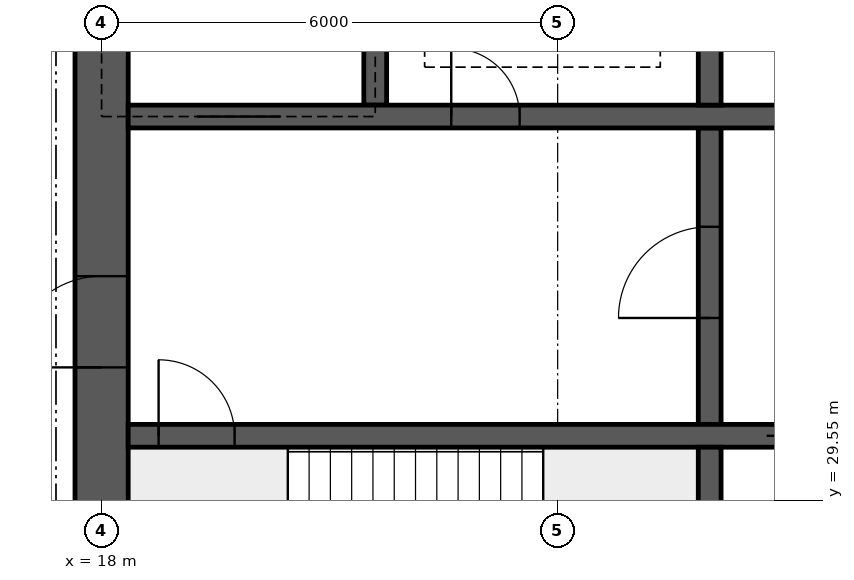
"""IFC4 building model, lengths in metres.
Left out: names, types, materials, properties, quantities, classifications, styles, units other than length and angle.
Written with IfcOpenShell. Run it as: python <this file> out.ifc"""

import sys

from ifc_helpers import new_model, si_unit, direction, frame, frame_2d, origin, place, context, subcontext, project, spatial, rectangle, extrude, element, fill, save


model = new_model("IFC4")
c1 = context("Model", 3, precision=1e-05, world=origin(), true_north=direction((0.0, 1.0)))
c2 = subcontext(c1, "Body", "Model", "MODEL_VIEW")
j1 = project(units=[si_unit("LENGTHUNIT", "METRE"), si_unit("PLANEANGLEUNIT", "RADIAN")], contexts=[c1])
p1 = place(None, origin())
s1 = spatial("IfcSite", under=j1, at=p1, CompositionType="ELEMENT")
p2 = place(p1, origin())
s2 = spatial("IfcBuilding", under=s1, at=p2, CompositionType="ELEMENT")
p3 = place(p2, frame((0.0, 0.0, 257.8)))
s3 = spatial("IfcBuildingStorey", under=s2, at=p3, CompositionType="ELEMENT", Elevation=257.8)
p4 = place(p3, frame((18.0, 26.15, 0.0), z_axis=(0.0, 0.0, 1.0), x_axis=(0.0, 1.0, 0.0)))
e1 = element("IfcWall", 1, at=p4, inside=s3, PredefinedType="SHEAR", context=c2, shape_type="SweptSolid", body=[
    extrude(rectangle(XDim=11.7, YDim=0.7, at=frame_2d((5.85, 0.0))), origin(), (0.0, 0.0, 1.0), 4.5),
])
p5 = place(p4, frame((5.15, 0.0, 0.0)))
e2 = element("IfcOpeningElement", 2, at=p5, cuts=e1, PredefinedType="OPENING", context=c2, shape_type="SweptSolid", body=[
    extrude(rectangle(XDim=1.2, YDim=2.1, at=frame_2d((0.6, 1.05))), frame((0.0, 0.36, 0.0), z_axis=(0.0, -1.0, 0.0), x_axis=(1.0, 0.0, 0.0)), (0.0, 0.0, 1.0), 0.72),
])
p6 = place(p3, frame((18.35, 30.4, 0.0), z_axis=(0.0, 0.0, 1.0), x_axis=(1.0, 0.0, 0.0)))
e3 = element("IfcWall", 3, at=p6, inside=s3, PredefinedType="SHEAR", context=c2, shape_type="SweptSolid", body=[
    extrude(rectangle(XDim=47.3, YDim=0.3, at=frame_2d((23.65, 0.0))), origin(), (0.0, 0.0, 1.0), 4.5),
])
p7 = place(p6, frame((0.4, 0.0, 0.0)))
e4 = element("IfcOpeningElement", 4, at=p7, cuts=e3, PredefinedType="OPENING", context=c2, shape_type="SweptSolid", body=[
    extrude(rectangle(XDim=1.0, YDim=2.1, at=frame_2d((0.5, 1.05))), frame((0.0, 0.16, 0.0), z_axis=(0.0, -1.0, 0.0), x_axis=(1.0, 0.0, 0.0)), (0.0, 0.0, 1.0), 0.32),
])
p8 = place(p6, frame((45.9, 0.0, 0.0)))
e5 = element("IfcOpeningElement", 5, at=p8, cuts=e3, PredefinedType="OPENING", context=c2, shape_type="SweptSolid", body=[
    extrude(rectangle(XDim=1.0, YDim=2.1, at=frame_2d((0.5, 1.05))), frame((0.0, 0.16, 0.0), z_axis=(0.0, -1.0, 0.0), x_axis=(1.0, 0.0, 0.0)), (0.0, 0.0, 1.0), 0.32),
])
p9 = place(p6, frame((8.4, 0.0, 0.0)))
e6 = element("IfcOpeningElement", 6, at=p9, cuts=e3, PredefinedType="OPENING", context=c2, shape_type="SweptSolid", body=[
    extrude(rectangle(XDim=1.1, YDim=2.1, at=frame_2d((0.55, 1.05))), frame((0.0, 0.16, 0.0), z_axis=(0.0, -1.0, 0.0), x_axis=(1.0, 0.0, 0.0)), (0.0, 0.0, 1.0), 0.32),
])
p10 = place(p6, frame((11.0, 0.0, 0.0)))
e7 = element("IfcOpeningElement", 7, at=p10, cuts=e3, PredefinedType="OPENING", context=c2, shape_type="SweptSolid", body=[
    extrude(rectangle(XDim=1.1, YDim=2.1, at=frame_2d((0.55, 1.05))), frame((0.0, 0.16, 0.0), z_axis=(0.0, -1.0, 0.0), x_axis=(1.0, 0.0, 0.0)), (0.0, 0.0, 1.0), 0.32),
])
p11 = place(p6, frame((13.6, 0.0, 0.0)))
e8 = element("IfcOpeningElement", 8, at=p11, cuts=e3, PredefinedType="OPENING", context=c2, shape_type="SweptSolid", body=[
    extrude(rectangle(XDim=1.1, YDim=2.1, at=frame_2d((0.55, 1.05))), frame((0.0, 0.16, 0.0), z_axis=(0.0, -1.0, 0.0), x_axis=(1.0, 0.0, 0.0)), (0.0, 0.0, 1.0), 0.32),
])
p12 = place(p6, frame((16.2, 0.0, 0.0)))
e9 = element("IfcOpeningElement", 9, at=p12, cuts=e3, PredefinedType="OPENING", context=c2, shape_type="SweptSolid", body=[
    extrude(rectangle(XDim=1.1, YDim=2.1, at=frame_2d((0.55, 1.05))), frame((0.0, 0.16, 0.0), z_axis=(0.0, -1.0, 0.0), x_axis=(1.0, 0.0, 0.0)), (0.0, 0.0, 1.0), 0.32),
])
p13 = place(p6, frame((18.975, 0.0, 0.0)))
e10 = element("IfcOpeningElement", 10, at=p13, cuts=e3, PredefinedType="OPENING", context=c2, shape_type="SweptSolid", body=[
    extrude(rectangle(XDim=0.9, YDim=2.1, at=frame_2d((0.45, 1.05))), frame((0.0, 0.16, 0.0), z_axis=(0.0, -1.0, 0.0), x_axis=(1.0, 0.0, 0.0)), (0.0, 0.0, 1.0), 0.32),
])
p14 = place(p6, frame((24.475, 0.0, 0.0)))
e11 = element("IfcOpeningElement", 11, at=p14, cuts=e3, PredefinedType="OPENING", context=c2, shape_type="SweptSolid", body=[
    extrude(rectangle(XDim=0.9, YDim=2.1, at=frame_2d((0.45, 1.05))), frame((0.0, 0.16, 0.0), z_axis=(0.0, -1.0, 0.0), x_axis=(1.0, 0.0, 0.0)), (0.0, 0.0, 1.0), 0.32),
])
p15 = place(p6, frame((30.267, 0.0, 0.0)))
e12 = element("IfcOpeningElement", 12, at=p15, cuts=e3, PredefinedType="OPENING", context=c2, shape_type="SweptSolid", body=[
    extrude(rectangle(XDim=1.1, YDim=2.1, at=frame_2d((0.55, 1.05))), frame((0.0, 0.16, 0.0), z_axis=(0.0, -1.0, 0.0), x_axis=(1.0, 0.0, 0.0)), (0.0, 0.0, 1.0), 0.32),
])
p16 = place(p6, frame((33.8, 0.0, 0.0)))
e13 = element("IfcOpeningElement", 13, at=p16, cuts=e3, PredefinedType="OPENING", context=c2, shape_type="SweptSolid", body=[
    extrude(rectangle(XDim=1.1, YDim=2.1, at=frame_2d((0.55, 1.05))), frame((0.0, 0.16, 0.0), z_axis=(0.0, -1.0, 0.0), x_axis=(1.0, 0.0, 0.0)), (0.0, 0.0, 1.0), 0.32),
])
p17 = place(p6, frame((37.333, 0.0, 0.0)))
e14 = element("IfcOpeningElement", 14, at=p17, cuts=e3, PredefinedType="OPENING", context=c2, shape_type="SweptSolid", body=[
    extrude(rectangle(XDim=1.1, YDim=2.1, at=frame_2d((0.55, 1.05))), frame((0.0, 0.16, 0.0), z_axis=(0.0, -1.0, 0.0), x_axis=(1.0, 0.0, 0.0)), (0.0, 0.0, 1.0), 0.32),
])
p18 = place(p3, frame((18.35, 34.6, 0.0), z_axis=(0.0, 0.0, 1.0), x_axis=(1.0, 0.0, 0.0)))
e15 = element("IfcWall", 15, at=p18, inside=s3, PredefinedType="SHEAR", context=c2, shape_type="SweptSolid", body=[
    extrude(rectangle(XDim=47.3, YDim=0.3, at=frame_2d((23.65, 0.0))), origin(), (0.0, 0.0, 1.0), 4.5),
])
p19 = place(p18, frame((0.9, 0.0, 0.0)))
e16 = element("IfcOpeningElement", 16, at=p19, cuts=e15, PredefinedType="OPENING", context=c2, shape_type="SweptSolid", body=[
    extrude(rectangle(XDim=1.1, YDim=2.1, at=frame_2d((0.55, 1.05))), frame((0.0, 0.16, 0.0), z_axis=(0.0, -1.0, 0.0), x_axis=(1.0, 0.0, 0.0)), (0.0, 0.0, 1.0), 0.32),
])
p20 = place(p18, frame((45.3, 0.0, 0.0)))
e17 = element("IfcOpeningElement", 17, at=p20, cuts=e15, PredefinedType="OPENING", context=c2, shape_type="SweptSolid", body=[
    extrude(rectangle(XDim=1.1, YDim=2.1, at=frame_2d((0.55, 1.05))), frame((0.0, 0.16, 0.0), z_axis=(0.0, -1.0, 0.0), x_axis=(1.0, 0.0, 0.0)), (0.0, 0.0, 1.0), 0.32),
])
p21 = place(p18, frame((4.25, 0.0, 0.0)))
e18 = element("IfcOpeningElement", 18, at=p21, cuts=e15, PredefinedType="OPENING", context=c2, shape_type="SweptSolid", body=[
    extrude(rectangle(XDim=0.9, YDim=2.1, at=frame_2d((0.45, 1.05))), frame((0.0, 0.16, 0.0), z_axis=(0.0, -1.0, 0.0), x_axis=(1.0, 0.0, 0.0)), (0.0, 0.0, 1.0), 0.32),
])
p22 = place(p18, frame((42.15, 0.0, 0.0)))
e19 = element("IfcOpeningElement", 19, at=p22, cuts=e15, PredefinedType="OPENING", context=c2, shape_type="SweptSolid", body=[
    extrude(rectangle(XDim=0.9, YDim=2.1, at=frame_2d((0.45, 1.05))), frame((0.0, 0.16, 0.0), z_axis=(0.0, -1.0, 0.0), x_axis=(1.0, 0.0, 0.0)), (0.0, 0.0, 1.0), 0.32),
])
p23 = place(p18, frame((9.025, 0.0, 0.0)))
e20 = element("IfcOpeningElement", 20, at=p23, cuts=e15, PredefinedType="OPENING", context=c2, shape_type="SweptSolid", body=[
    extrude(rectangle(XDim=0.9, YDim=2.1, at=frame_2d((0.45, 1.05))), frame((0.0, 0.16, 0.0), z_axis=(0.0, -1.0, 0.0), x_axis=(1.0, 0.0, 0.0)), (0.0, 0.0, 1.0), 0.32),
])
p24 = place(p18, frame((12.999, 0.0, 0.0)))
e21 = element("IfcOpeningElement", 21, at=p24, cuts=e15, PredefinedType="OPENING", context=c2, shape_type="SweptSolid", body=[
    extrude(rectangle(XDim=0.9, YDim=2.1, at=frame_2d((0.45, 1.05))), frame((0.0, 0.16, 0.0), z_axis=(0.0, -1.0, 0.0), x_axis=(1.0, 0.0, 0.0)), (0.0, 0.0, 1.0), 0.32),
])
p25 = place(p18, frame((16.646, 0.0, 0.0)))
e22 = element("IfcOpeningElement", 22, at=p25, cuts=e15, PredefinedType="OPENING", context=c2, shape_type="SweptSolid", body=[
    extrude(rectangle(XDim=0.9, YDim=2.1, at=frame_2d((0.45, 1.05))), frame((0.0, 0.16, 0.0), z_axis=(0.0, -1.0, 0.0), x_axis=(1.0, 0.0, 0.0)), (0.0, 0.0, 1.0), 0.32),
])
p26 = place(p18, frame((20.405, 0.0, 0.0)))
e23 = element("IfcOpeningElement", 23, at=p26, cuts=e15, PredefinedType="OPENING", context=c2, shape_type="SweptSolid", body=[
    extrude(rectangle(XDim=0.9, YDim=2.1, at=frame_2d((0.45, 1.05))), frame((0.0, 0.16, 0.0), z_axis=(0.0, -1.0, 0.0), x_axis=(1.0, 0.0, 0.0)), (0.0, 0.0, 1.0), 0.32),
])
p27 = place(p18, frame((24.811, 0.0, 0.0)))
e24 = element("IfcOpeningElement", 24, at=p27, cuts=e15, PredefinedType="OPENING", context=c2, shape_type="SweptSolid", body=[
    extrude(rectangle(XDim=0.9, YDim=2.1, at=frame_2d((0.45, 1.05))), frame((0.0, 0.16, 0.0), z_axis=(0.0, -1.0, 0.0), x_axis=(1.0, 0.0, 0.0)), (0.0, 0.0, 1.0), 0.32),
])
p28 = place(p18, frame((27.608, 0.0, 0.0)))
e25 = element("IfcOpeningElement", 25, at=p28, cuts=e15, PredefinedType="OPENING", context=c2, shape_type="SweptSolid", body=[
    extrude(rectangle(XDim=0.9, YDim=2.1, at=frame_2d((0.45, 1.05))), frame((0.0, 0.16, 0.0), z_axis=(0.0, -1.0, 0.0), x_axis=(1.0, 0.0, 0.0)), (0.0, 0.0, 1.0), 0.32),
])
p29 = place(p18, frame((29.981, 0.0, 0.0)))
e26 = element("IfcOpeningElement", 26, at=p29, cuts=e15, PredefinedType="OPENING", context=c2, shape_type="SweptSolid", body=[
    extrude(rectangle(XDim=0.9, YDim=2.1, at=frame_2d((0.45, 1.05))), frame((0.0, 0.16, 0.0), z_axis=(0.0, -1.0, 0.0), x_axis=(1.0, 0.0, 0.0)), (0.0, 0.0, 1.0), 0.32),
])
p30 = place(p18, frame((33.831, 0.0, 0.0)))
e27 = element("IfcOpeningElement", 27, at=p30, cuts=e15, PredefinedType="OPENING", context=c2, shape_type="SweptSolid", body=[
    extrude(rectangle(XDim=0.9, YDim=2.1, at=frame_2d((0.45, 1.05))), frame((0.0, 0.16, 0.0), z_axis=(0.0, -1.0, 0.0), x_axis=(1.0, 0.0, 0.0)), (0.0, 0.0, 1.0), 0.32),
])
p31 = place(p18, frame((37.579, 0.0, 0.0)))
e28 = element("IfcOpeningElement", 28, at=p31, cuts=e15, PredefinedType="OPENING", context=c2, shape_type="SweptSolid", body=[
    extrude(rectangle(XDim=0.9, YDim=2.1, at=frame_2d((0.45, 1.05))), frame((0.0, 0.16, 0.0), z_axis=(0.0, -1.0, 0.0), x_axis=(1.0, 0.0, 0.0)), (0.0, 0.0, 1.0), 0.32),
])
p32 = place(p3, frame((26.0, 26.15, 0.0), z_axis=(0.0, 0.0, 1.0), x_axis=(0.0, 1.0, 0.0)))
e29 = element("IfcWall", 29, at=p32, inside=s3, PredefinedType="SHEAR", context=c2, shape_type="SweptSolid", body=[
    extrude(rectangle(XDim=4.1, YDim=0.3, at=frame_2d((2.05, 0.0))), origin(), (0.0, 0.0, 1.0), 4.5),
])
p33 = place(p3, frame((26.0, 30.55, 0.0), z_axis=(0.0, 0.0, 1.0), x_axis=(0.0, 1.0, 0.0)))
e30 = element("IfcWall", 30, at=p33, inside=s3, PredefinedType="SHEAR", context=c2, shape_type="SweptSolid", body=[
    extrude(rectangle(XDim=3.9, YDim=0.3, at=frame_2d((1.95, 0.0))), origin(), (0.0, 0.0, 1.0), 4.5),
])
p34 = place(p33, frame((1.4, 0.0, 0.0)))
e31 = element("IfcOpeningElement", 31, at=p34, cuts=e30, PredefinedType="OPENING", context=c2, shape_type="SweptSolid", body=[
    extrude(rectangle(XDim=1.2, YDim=2.1, at=frame_2d((0.6, 1.05))), frame((0.0, 0.16, 0.0), z_axis=(0.0, -1.0, 0.0), x_axis=(1.0, 0.0, 0.0)), (0.0, 0.0, 1.0), 0.32),
])
for number, where, z_axis, x_axis in (
    (32, (21.6, 34.75, 0.0), (0.0, 0.0, 1.0), (0.0, 1.0, 0.0)),
    (33, (26.0, 34.75, 0.0), (0.0, 0.0, 1.0), (0.0, 1.0, 0.0)),
):
    element("IfcWall", number, at=place(p3, frame(where, z_axis=z_axis, x_axis=x_axis)), inside=s3, PredefinedType="SHEAR", context=c2, shape_type="SweptSolid", body=[
        extrude(rectangle(XDim=3.1, YDim=0.3, at=frame_2d((1.55, 0.0))), origin(), (0.0, 0.0, 1.0), 4.5),
    ])
p35 = place(p5, origin())
e34 = element("IfcDoor", 34, at=p35, inside=s3, OperationType="SINGLE_SWING_LEFT", PredefinedType="DOOR", context=c2, shape_type="SweptSolid", body=[
    extrude(rectangle(XDim=1.2, YDim=2.1, at=frame_2d((0.6, 1.05))), frame((0.0, 0.025, 0.0), z_axis=(0.0, -1.0, 0.0), x_axis=(1.0, 0.0, 0.0)), (0.0, 0.0, 1.0), 0.05),
])
fill(e2, e34)
p36 = place(p7, origin())
e35 = element("IfcDoor", 35, at=p36, inside=s3, OperationType="SINGLE_SWING_LEFT", PredefinedType="DOOR", context=c2, shape_type="SweptSolid", body=[
    extrude(rectangle(XDim=1.0, YDim=2.1, at=frame_2d((0.5, 1.05))), frame((0.0, 0.025, 0.0), z_axis=(0.0, -1.0, 0.0), x_axis=(1.0, 0.0, 0.0)), (0.0, 0.0, 1.0), 0.05),
])
fill(e4, e35)
p37 = place(p19, origin())
e36 = element("IfcDoor", 36, at=p37, inside=s3, OperationType="DOUBLE_DOOR_SLIDING", PredefinedType="DOOR", context=c2, shape_type="SweptSolid", body=[
    extrude(rectangle(XDim=1.1, YDim=2.1, at=frame_2d((0.55, 1.05))), frame((0.0, 0.025, 0.0), z_axis=(0.0, -1.0, 0.0), x_axis=(1.0, 0.0, 0.0)), (0.0, 0.0, 1.0), 0.05),
])
fill(e16, e36)
p38 = place(p21, origin())
e37 = element("IfcDoor", 37, at=p38, inside=s3, OperationType="SINGLE_SWING_LEFT", PredefinedType="DOOR", context=c2, shape_type="SweptSolid", body=[
    extrude(rectangle(XDim=0.9, YDim=2.1, at=frame_2d((0.45, 1.05))), frame((0.0, 0.025, 0.0), z_axis=(0.0, -1.0, 0.0), x_axis=(1.0, 0.0, 0.0)), (0.0, 0.0, 1.0), 0.05),
])
fill(e18, e37)
p39 = place(p34, origin())
e38 = element("IfcDoor", 38, at=p39, inside=s3, OperationType="SINGLE_SWING_LEFT", PredefinedType="DOOR", context=c2, shape_type="SweptSolid", body=[
    extrude(rectangle(XDim=1.2, YDim=2.1, at=frame_2d((0.6, 1.05))), frame((0.0, 0.025, 0.0), z_axis=(0.0, -1.0, 0.0), x_axis=(1.0, 0.0, 0.0)), (0.0, 0.0, 1.0), 0.05),
])
fill(e31, e38)
p40 = place(p9, origin())
e39 = element("IfcDoor", 39, at=p40, inside=s3, OperationType="DOUBLE_DOOR_SLIDING", PredefinedType="DOOR", context=c2, shape_type="SweptSolid", body=[
    extrude(rectangle(XDim=1.1, YDim=2.1, at=frame_2d((0.55, 1.05))), frame((0.0, 0.025, 0.0), z_axis=(0.0, -1.0, 0.0), x_axis=(1.0, 0.0, 0.0)), (0.0, 0.0, 1.0), 0.05),
])
fill(e6, e39)
save(model, sys.argv[1])
